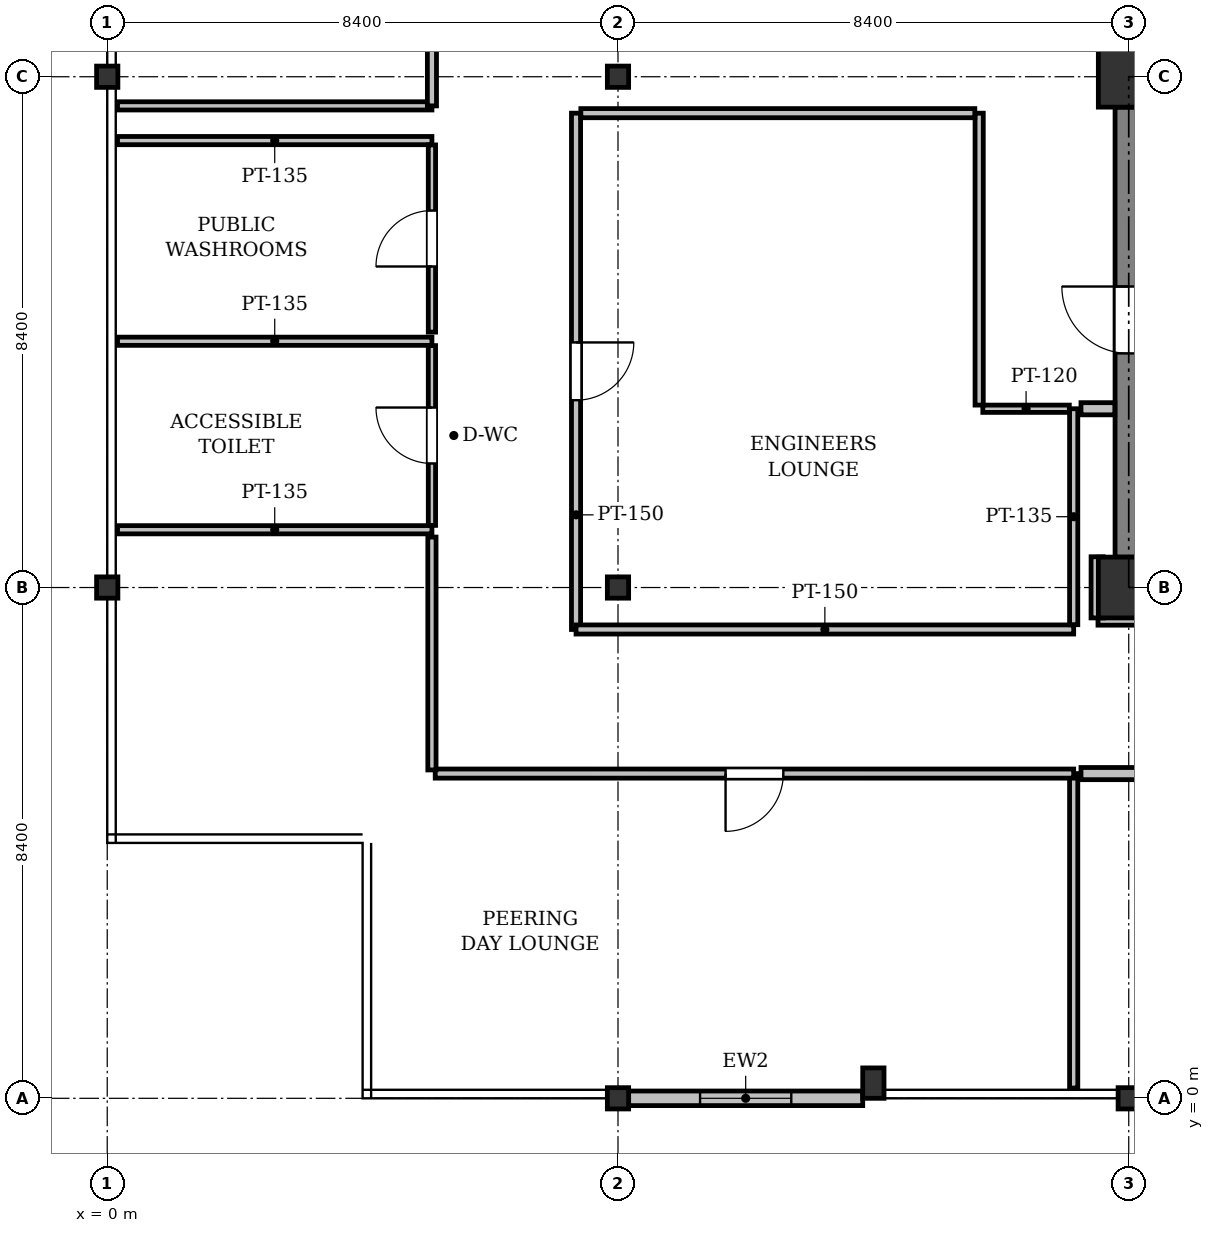
"""IFC4 building model, lengths in metres.
Left out: names, types, materials, properties, quantities, classifications, styles, units other than length and angle.
Written with IfcOpenShell. Run it as: python <this file> out.ifc"""

import sys

from ifc_helpers import new_model, si_unit, direction, frame, frame_2d, origin, origin_2d, place, context, subcontext, project, spatial, rectangle, i_section, extrude, element, fill, save


model = new_model("IFC4")
c1 = context("Model", 3, precision=1e-05, world=origin(), true_north=direction((0.0, 1.0)))
c2 = subcontext(c1, "Body", "Model", "MODEL_VIEW")
j1 = project(units=[si_unit("LENGTHUNIT", "METRE"), si_unit("PLANEANGLEUNIT", "RADIAN")], contexts=[c1])
p1 = place(None, origin())
s1 = spatial("IfcSite", under=j1, at=p1, CompositionType="ELEMENT")
p2 = place(p1, origin())
s2 = spatial("IfcBuilding", under=s1, at=p2, CompositionType="ELEMENT")
p3 = place(p2, frame((0.0, 0.0, 224.7)))
s3 = spatial("IfcBuildingStorey", under=s2, at=p3, CompositionType="ELEMENT", Elevation=224.7)
for number, where, z_axis, x_axis in (
    (1, (0.0, 8.4, 0.0), (0.0, 0.0, 1.0), (1.0, 0.0, 0.0)),
    (2, (0.0, 16.8, 0.0), (0.0, 0.0, 1.0), (1.0, 0.0, 0.0)),
    (3, (8.4, 0.0, 0.0), (0.0, 0.0, 1.0), (1.0, 0.0, 0.0)),
    (4, (8.4, 8.4, 0.0), (0.0, 0.0, 1.0), (1.0, 0.0, 0.0)),
    (5, (8.4, 16.8, 0.0), (0.0, 0.0, 1.0), (1.0, 0.0, 0.0)),
    (6, (16.8, 0.0, 0.0), (0.0, 0.0, 1.0), (1.0, 0.0, 0.0)),
):
    element("IfcColumn", number, at=place(p3, frame(where, z_axis=z_axis, x_axis=x_axis)), inside=s3, PredefinedType="COLUMN", context=c2, shape_type="SweptSolid", body=[
        extrude(i_section(OverallWidth=0.35, OverallDepth=0.35, WebThickness=0.02, FlangeThickness=0.032, at=origin_2d()), origin(), (0.0, 0.0, 1.0), 4.1),
    ])
for number, where, z_axis, x_axis in (
    (7, (16.8, 8.4, 0.0), (0.0, 0.0, 1.0), (1.0, 0.0, 0.0)),
    (8, (16.8, 16.8, 0.0), (0.0, 0.0, 1.0), (1.0, 0.0, 0.0)),
):
    element("IfcColumn", number, at=place(p3, frame(where, z_axis=z_axis, x_axis=x_axis)), inside=s3, PredefinedType="COLUMN", context=c2, shape_type="SweptSolid", body=[
        extrude(rectangle(XDim=1.0, YDim=1.0, at=origin_2d()), origin(), (0.0, 0.0, 1.0), 4.1),
    ])
p4 = place(p3, frame((12.6, 0.25, 0.0), z_axis=(0.0, 0.0, 1.0), x_axis=(1.0, 0.0, 0.0)))
e9 = element("IfcColumn", 9, at=p4, inside=s3, PredefinedType="PILASTER", context=c2, shape_type="SweptSolid", body=[
    extrude(rectangle(XDim=0.35, YDim=0.5, at=origin_2d()), origin(), (0.0, 0.0, 1.0), 4.1),
])
p5 = place(p3, frame((12.425, 0.0, 0.0), z_axis=(0.0, 0.0, 1.0), x_axis=(-1.0, 0.0, 0.0)))
e10 = element("IfcWall", 10, at=p5, inside=s3, PredefinedType="STANDARD", context=c2, shape_type="SweptSolid", body=[
    extrude(rectangle(XDim=3.85, YDim=0.24, at=frame_2d((1.925, 0.0))), origin(), (0.0, 0.0, 1.0), 3.525),
])
p6 = place(p5, frame((1.175, 0.0, 0.9)))
e11 = element("IfcOpeningElement", 11, at=p6, cuts=e10, PredefinedType="OPENING", context=c2, shape_type="SweptSolid", body=[
    extrude(rectangle(XDim=1.5, YDim=1.6, at=frame_2d((0.75, 0.8))), frame((0.0, 0.13, 0.0), z_axis=(0.0, -1.0, 0.0), x_axis=(1.0, 0.0, 0.0)), (0.0, 0.0, 1.0), 0.26),
])
p7 = place(p3, frame((16.8, 8.9, 0.0), z_axis=(0.0, 0.0, 1.0), x_axis=(0.0, 1.0, 0.0)))
e12 = element("IfcWall", 12, at=p7, inside=s3, PredefinedType="SHEAR", context=c2, shape_type="SweptSolid", body=[
    extrude(rectangle(XDim=7.4, YDim=0.45, at=frame_2d((3.7, 0.0))), origin(), (0.0, 0.0, 1.0), 3.825),
])
p8 = place(p7, frame((3.35, 0.0, 0.0)))
e13 = element("IfcOpeningElement", 13, at=p8, cuts=e12, PredefinedType="OPENING", context=c2, shape_type="SweptSolid", body=[
    extrude(rectangle(XDim=1.1, YDim=2.15, at=frame_2d((0.55, 1.075))), frame((0.0, 0.235, 0.0), z_axis=(0.0, -1.0, 0.0), x_axis=(1.0, 0.0, 0.0)), (0.0, 0.0, 1.0), 0.47),
])
for number, where, z_axis, x_axis in (
    (14, (5.34, 12.45, 0.0), (0.0, 0.0, 1.0), (-1.0, 0.0, 0.0)),
    (15, (0.169, 9.35, 0.0), (0.0, 0.0, 1.0), (1.0, 0.0, 0.0)),
):
    element("IfcWall", number, at=place(p3, frame(where, z_axis=z_axis, x_axis=x_axis)), inside=s3, PredefinedType="PARTITIONING", context=c2, shape_type="SweptSolid", body=[
        extrude(rectangle(XDim=5.171, YDim=0.135, at=frame_2d((2.585, 0.0))), origin(), (0.0, 0.0, 1.0), 3.518),
    ])
p9 = place(p3, frame((5.34, 9.421, 0.0), z_axis=(0.0, 0.0, 1.0), x_axis=(0.0, 1.0, 0.0)))
e16 = element("IfcWall", 16, at=p9, inside=s3, PredefinedType="PARTITIONING", context=c2, shape_type="SweptSolid", body=[
    extrude(rectangle(XDim=2.957, YDim=0.12, at=frame_2d((1.479, 0.0))), origin(), (0.0, 0.0, 1.0), 3.825),
])
p10 = place(p9, frame((1.019, 0.0, 0.0)))
e17 = element("IfcOpeningElement", 17, at=p10, cuts=e16, PredefinedType="OPENING", context=c2, shape_type="SweptSolid", body=[
    extrude(rectangle(XDim=0.92, YDim=2.1, at=frame_2d((0.46, 1.05))), frame((0.0, 0.07, 0.0), z_axis=(0.0, -1.0, 0.0), x_axis=(1.0, 0.0, 0.0)), (0.0, 0.0, 1.0), 0.14),
])
p11 = place(p3, frame((5.34, 15.75, 0.0), z_axis=(0.0, 0.0, 1.0), x_axis=(-1.0, 0.0, 0.0)))
e18 = element("IfcWall", 18, at=p11, inside=s3, PredefinedType="PARTITIONING", context=c2, shape_type="SweptSolid", body=[
    extrude(rectangle(XDim=5.171, YDim=0.135, at=frame_2d((2.585, 0.0))), origin(), (0.0, 0.0, 1.0), 3.518),
])
p12 = place(p3, frame((5.34, 12.6, 0.0), z_axis=(0.0, 0.0, 1.0), x_axis=(0.0, 1.0, 0.0)))
e19 = element("IfcWall", 19, at=p12, inside=s3, PredefinedType="PARTITIONING", context=c2, shape_type="SweptSolid", body=[
    extrude(rectangle(XDim=3.078, YDim=0.12, at=frame_2d((1.539, 0.0))), origin(), (0.0, 0.0, 1.0), 3.825),
])
p13 = place(p12, frame((1.079, 0.0, 0.0)))
e20 = element("IfcOpeningElement", 20, at=p13, cuts=e19, PredefinedType="OPENING", context=c2, shape_type="SweptSolid", body=[
    extrude(rectangle(XDim=0.92, YDim=2.1, at=frame_2d((0.46, 1.05))), frame((0.0, 0.07, 0.0), z_axis=(0.0, -1.0, 0.0), x_axis=(1.0, 0.0, 0.0)), (0.0, 0.0, 1.0), 0.14),
])
p14 = place(p3, frame((7.71, 16.201, 0.0), z_axis=(0.0, 0.0, 1.0), x_axis=(0.0, -1.0, 0.0)))
e21 = element("IfcWall", 21, at=p14, inside=s3, PredefinedType="PARTITIONING", context=c2, shape_type="SweptSolid", body=[
    extrude(rectangle(XDim=8.491, YDim=0.15, at=frame_2d((4.245, 0.0))), origin(), (0.0, 0.0, 1.0), 3.365),
])
p15 = place(p14, frame((3.771, 0.0, 0.0)))
e22 = element("IfcOpeningElement", 22, at=p15, cuts=e21, PredefinedType="OPENING", context=c2, shape_type="SweptSolid", body=[
    extrude(rectangle(XDim=0.95, YDim=2.15, at=frame_2d((0.475, 1.075))), frame((0.0, 0.085, 0.0), z_axis=(0.0, -1.0, 0.0), x_axis=(1.0, 0.0, 0.0)), (0.0, 0.0, 1.0), 0.17),
])
p16 = place(p3, frame((7.71, 7.71, 0.0), z_axis=(0.0, 0.0, 1.0), x_axis=(1.0, 0.0, 0.0)))
e23 = element("IfcWall", 23, at=p16, inside=s3, PredefinedType="PARTITIONING", context=c2, shape_type="SweptSolid", body=[
    extrude(rectangle(XDim=8.185, YDim=0.15, at=frame_2d((4.092, 0.0))), origin(), (0.0, 0.0, 1.0), 3.371),
])
p17 = place(p3, frame((15.895, 7.789, 0.0), z_axis=(0.0, 0.0, 1.0), x_axis=(0.0, 1.0, 0.0)))
e24 = element("IfcWall", 24, at=p17, inside=s3, PredefinedType="PARTITIONING", context=c2, shape_type="SweptSolid", body=[
    extrude(rectangle(XDim=3.551, YDim=0.135, at=frame_2d((1.776, 0.0))), origin(), (0.0, 0.0, 1.0), 3.365),
])
p18 = place(p3, frame((15.823, 11.34, 0.0), z_axis=(0.0, 0.0, 1.0), x_axis=(-1.0, 0.0, 0.0)))
e25 = element("IfcWall", 25, at=p18, inside=s3, PredefinedType="PARTITIONING", context=c2, shape_type="SweptSolid", body=[
    extrude(rectangle(XDim=1.423, YDim=0.12, at=frame_2d((0.711, 0.0))), origin(), (0.0, 0.0, 1.0), 3.825),
])
p19 = place(p3, frame((14.34, 11.4, 0.0), z_axis=(0.0, 0.0, 1.0), x_axis=(0.0, 1.0, 0.0)))
e26 = element("IfcWall", 26, at=p19, inside=s3, PredefinedType="PARTITIONING", context=c2, shape_type="SweptSolid", body=[
    extrude(rectangle(XDim=4.801, YDim=0.135, at=frame_2d((2.4, 0.0))), origin(), (0.0, 0.0, 1.0), 3.825),
])
p20 = place(p3, frame((14.269, 16.201, 0.0), z_axis=(0.0, 0.0, 1.0), x_axis=(-1.0, 0.0, 0.0)))
e27 = element("IfcWall", 27, at=p20, inside=s3, PredefinedType="PARTITIONING", context=c2, shape_type="SweptSolid", body=[
    extrude(rectangle(XDim=6.479, YDim=0.15, at=frame_2d((3.24, 0.0))), origin(), (0.0, 0.0, 1.0), 3.371),
])
p21 = place(p3, frame((15.895, 0.169, 0.0), z_axis=(0.0, 0.0, 1.0), x_axis=(0.0, 1.0, 0.0)))
e28 = element("IfcWall", 28, at=p21, inside=s3, PredefinedType="PARTITIONING", context=c2, shape_type="SweptSolid", body=[
    extrude(rectangle(XDim=5.171, YDim=0.135, at=frame_2d((2.585, 0.0))), origin(), (0.0, 0.0, 1.0), 3.825),
])
p22 = place(p3, frame((15.895, 5.34, 0.0), z_axis=(0.0, 0.0, 1.0), x_axis=(-0.99999999973, 2.3250407e-05, 0.0)))
e29 = element("IfcWall", 29, at=p22, inside=s3, PredefinedType="PARTITIONING", context=c2, shape_type="SweptSolid", body=[
    extrude(rectangle(XDim=10.5, YDim=0.15, at=frame_2d((5.25, 0.0))), origin(), (0.0, 0.0, 1.0), 3.371),
])
p23 = place(p22, frame((4.775, 0.0, 0.0)))
e30 = element("IfcOpeningElement", 30, at=p23, cuts=e29, PredefinedType="OPENING", context=c2, shape_type="SweptSolid", body=[
    extrude(rectangle(XDim=0.95, YDim=2.15, at=frame_2d((0.475, 1.075))), frame((0.0, 0.085, 0.0), z_axis=(0.0, -1.0, 0.0), x_axis=(1.0, 0.0, 0.0)), (0.0, 0.0, 1.0), 0.17),
])
p24 = place(p3, frame((5.34, 5.4, 0.0), z_axis=(0.0, 0.0, 1.0), x_axis=(0.0, 1.0, 0.0)))
e31 = element("IfcWall", 31, at=p24, inside=s3, PredefinedType="PARTITIONING", context=c2, shape_type="SweptSolid", body=[
    extrude(rectangle(XDim=3.83, YDim=0.135, at=frame_2d((1.915, 0.0))), origin(), (0.0, 0.0, 1.0), 3.365),
])
p25 = place(p3, frame((0.169, 16.321, 0.0), z_axis=(0.0, 0.0, 1.0), x_axis=(1.0, 0.0, 0.0)))
e32 = element("IfcWall", 32, at=p25, inside=s3, PredefinedType="PARTITIONING", context=c2, shape_type="SweptSolid", body=[
    extrude(rectangle(XDim=5.171, YDim=0.135, at=frame_2d((2.585, 0.0))), origin(), (0.0, 0.0, 1.0), 3.518),
])
p26 = place(p3, frame((5.34, 16.321, 0.0), z_axis=(0.0, 0.0, 1.0), x_axis=(1.1578765e-05, 0.999999999933, 0.0)))
e33 = element("IfcWall", 33, at=p26, inside=s3, PredefinedType="PARTITIONING", context=c2, shape_type="SweptSolid", body=[
    extrude(rectangle(XDim=21.085, YDim=0.15, at=frame_2d((10.542, 0.0))), origin(), (0.0, 0.0, 1.0), 3.365),
])
p27 = place(p26, frame((10.068, 0.0, 0.0)))
e34 = element("IfcOpeningElement", 34, at=p27, cuts=e33, PredefinedType="OPENING", context=c2, shape_type="SweptSolid", body=[
    extrude(rectangle(XDim=0.95, YDim=2.15, at=frame_2d((0.475, 1.075))), frame((0.0, 0.085, 0.0), z_axis=(0.0, -1.0, 0.0), x_axis=(1.0, 0.0, 0.0)), (0.0, 0.0, 1.0), 0.17),
])
p28 = place(p3, frame((26.0, 5.34, 0.0), z_axis=(0.0, 0.0, 1.0), x_axis=(-1.0, 0.0, 0.0)))
e35 = element("IfcWall", 35, at=p28, inside=s3, PredefinedType="PARTITIONING", context=c2, shape_type="SweptSolid", body=[
    extrude(rectangle(XDim=9.985, YDim=0.2, at=frame_2d((4.993, 0.0))), origin(), (0.0, 0.0, 1.0), 3.371),
])
p29 = place(p3, frame((17.306, 7.881, 0.0), z_axis=(0.0, 0.0, 1.0), x_axis=(-1.0, 0.0, 0.0)))
e36 = element("IfcWall", 36, at=p29, inside=s3, PredefinedType="PARTITIONING", context=c2, shape_type="SweptSolid", body=[
    extrude(rectangle(XDim=1.012, YDim=0.2, at=frame_2d((0.506, 0.0))), origin(), (0.0, 0.0, 1.0), 3.371),
])
p30 = place(p3, frame((16.28, 7.9, 0.0), z_axis=(0.0, 0.0, 1.0), x_axis=(0.000970873329, 0.999999528702, 0.0)))
e37 = element("IfcWall", 37, at=p30, inside=s3, PredefinedType="PARTITIONING", context=c2, shape_type="SweptSolid", body=[
    extrude(rectangle(XDim=1.006, YDim=0.2, at=frame_2d((0.503, 0.0))), origin(), (0.0, 0.0, 1.0), 3.365),
])
p31 = place(p3, frame((16.571, 11.34, 0.0), z_axis=(0.0, 0.0, 1.0), x_axis=(-1.0, 0.0, 0.0)))
e38 = element("IfcWall", 38, at=p31, inside=s3, PredefinedType="PARTITIONING", context=c2, shape_type="SweptSolid", body=[
    extrude(rectangle(XDim=0.556, YDim=0.2, at=frame_2d((0.278, 0.0))), origin(), (0.0, 0.0, 1.0), 3.825),
])
p32 = place(p6, origin())
e39 = element("IfcWindow", 39, at=p32, inside=s3, PartitioningType="SINGLE_PANEL", PredefinedType="WINDOW", context=c2, shape_type="SweptSolid", body=[
    extrude(rectangle(XDim=1.5, YDim=1.6, at=frame_2d((0.75, 0.8))), frame((0.0, 0.03, 0.0), z_axis=(0.0, -1.0, 0.0), x_axis=(1.0, 0.0, 0.0)), (0.0, 0.0, 1.0), 0.06),
])
fill(e11, e39)
p33 = place(p8, origin())
e40 = element("IfcDoor", 40, at=p33, inside=s3, OperationType="SINGLE_SWING_RIGHT", PredefinedType="DOOR", context=c2, shape_type="SweptSolid", body=[
    extrude(rectangle(XDim=1.1, YDim=2.15, at=frame_2d((0.55, 1.075))), frame((0.0, 0.025, 0.0), z_axis=(0.0, -1.0, 0.0), x_axis=(1.0, 0.0, 0.0)), (0.0, 0.0, 1.0), 0.05),
])
fill(e13, e40)
p34 = place(p10, origin())
e41 = element("IfcDoor", 41, at=p34, inside=s3, OperationType="SINGLE_SWING_RIGHT", PredefinedType="DOOR", context=c2, shape_type="SweptSolid", body=[
    extrude(rectangle(XDim=0.92, YDim=2.1, at=frame_2d((0.46, 1.05))), frame((0.0, 0.025, 0.0), z_axis=(0.0, -1.0, 0.0), x_axis=(1.0, 0.0, 0.0)), (0.0, 0.0, 1.0), 0.05),
])
fill(e17, e41)
p35 = place(p13, origin())
e42 = element("IfcDoor", 42, at=p35, inside=s3, OperationType="SINGLE_SWING_LEFT", PredefinedType="DOOR", context=c2, shape_type="SweptSolid", body=[
    extrude(rectangle(XDim=0.92, YDim=2.1, at=frame_2d((0.46, 1.05))), frame((0.0, 0.025, 0.0), z_axis=(0.0, -1.0, 0.0), x_axis=(1.0, 0.0, 0.0)), (0.0, 0.0, 1.0), 0.05),
])
fill(e20, e42)
p36 = place(p15, origin())
e43 = element("IfcDoor", 43, at=p36, inside=s3, OperationType="SINGLE_SWING_LEFT", PredefinedType="DOOR", context=c2, shape_type="SweptSolid", body=[
    extrude(rectangle(XDim=0.95, YDim=2.15, at=frame_2d((0.475, 1.075))), frame((0.0, 0.025, 0.0), z_axis=(0.0, -1.0, 0.0), x_axis=(1.0, 0.0, 0.0)), (0.0, 0.0, 1.0), 0.05),
])
fill(e22, e43)
p37 = place(p23, origin())
e44 = element("IfcDoor", 44, at=p37, inside=s3, OperationType="SINGLE_SWING_RIGHT", PredefinedType="DOOR", context=c2, shape_type="SweptSolid", body=[
    extrude(rectangle(XDim=0.95, YDim=2.15, at=frame_2d((0.475, 1.075))), frame((0.0, 0.025, 0.0), z_axis=(0.0, -1.0, 0.0), x_axis=(1.0, 0.0, 0.0)), (0.0, 0.0, 1.0), 0.05),
])
fill(e30, e44)
save(model, sys.argv[1])
